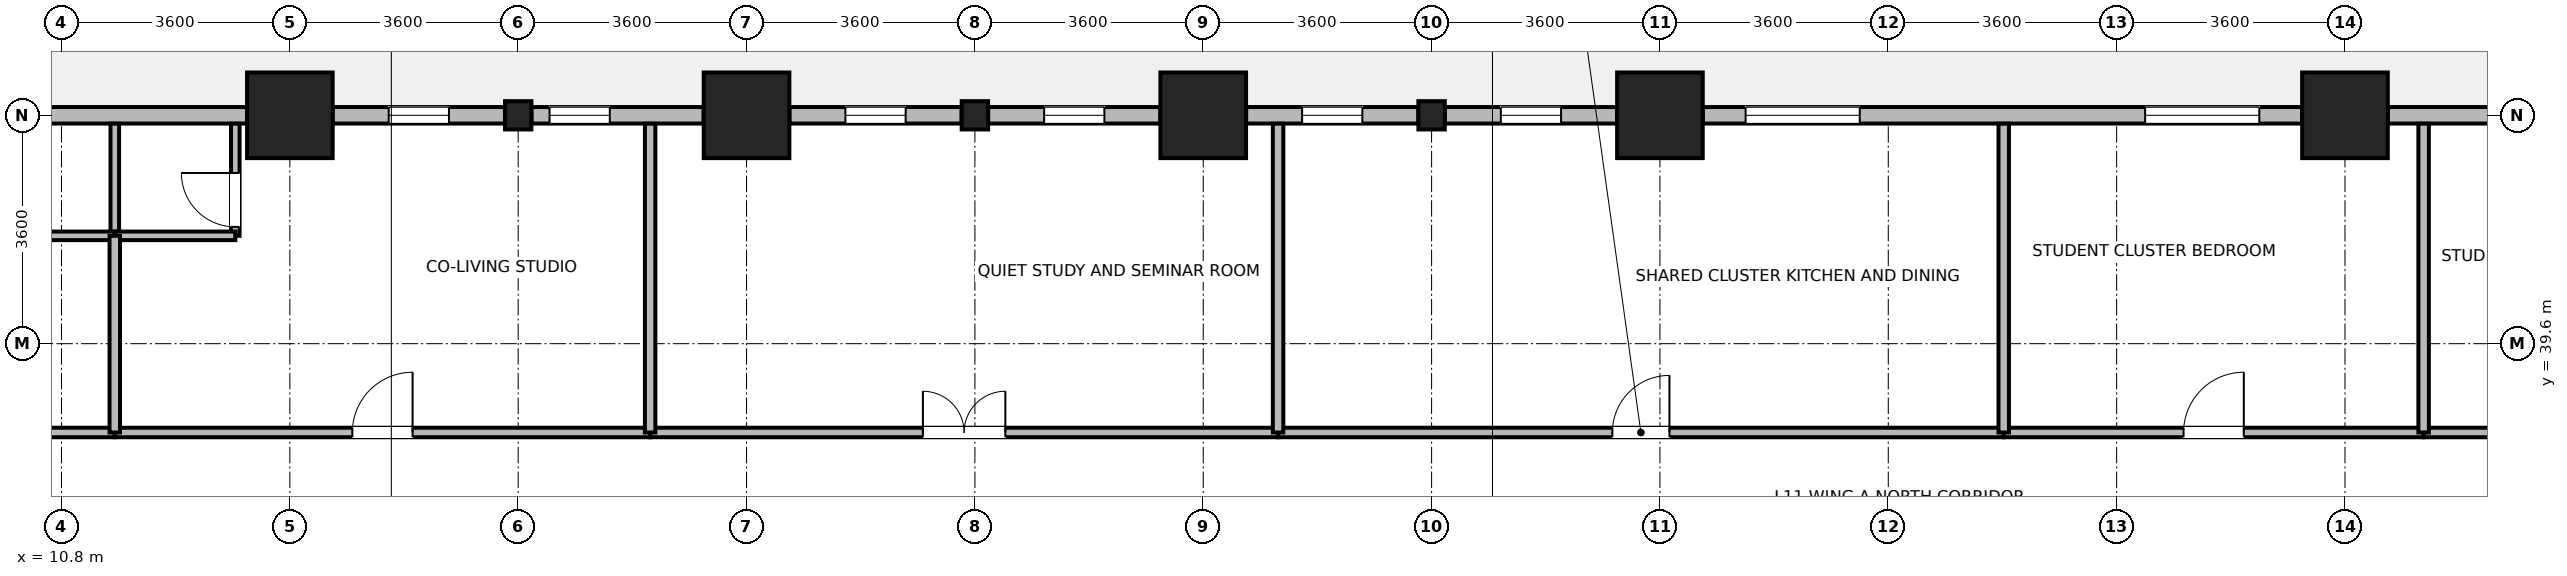
"""IFC4 building model, lengths in metres.
Left out: names, types, materials, properties, quantities, classifications, styles, units other than length and angle.
Written with IfcOpenShell. Run it as: python <this file> out.ifc"""

import sys

from ifc_helpers import new_model, si_unit, direction, frame, frame_2d, origin, origin_2d, place, context, subcontext, project, spatial, rectangle, i_section, extrude, source, transform, mapped, element, fill, save


model = new_model("IFC4")
c1 = context("Model", 3, precision=1e-05, world=origin(), true_north=direction((0.0, 1.0)))
c2 = subcontext(c1, "Body", "Model", "MODEL_VIEW")
j1 = project(units=[si_unit("LENGTHUNIT", "METRE"), si_unit("PLANEANGLEUNIT", "RADIAN")], contexts=[c1])
p1 = place(None, origin())
s1 = spatial("IfcSite", under=j1, at=p1, CompositionType="ELEMENT")
p2 = place(p1, origin())
s2 = spatial("IfcBuilding", under=s1, at=p2, CompositionType="ELEMENT")
p3 = place(p2, frame((0.0, 0.0, 47.5)))
s3 = spatial("IfcBuildingStorey", under=s2, at=p3, CompositionType="ELEMENT", Elevation=47.5)
m1 = source(origin(), c2, "Body", "SweptSolid", [
    extrude(rectangle(XDim=1.35, YDim=1.35, at=origin_2d()), origin(), (0.0, 0.0, 1.0), 3.7),
])
for number, where, z_axis, x_axis in (
    (1, (14.4, 43.2, 0.0), (0.0, 0.0, 1.0), (1.0, 0.0, 0.0)),
    (2, (21.6, 43.2, 0.0), (0.0, 0.0, 1.0), (1.0, 0.0, 0.0)),
    (3, (28.8, 43.2, 0.0), (0.0, 0.0, 1.0), (1.0, 0.0, 0.0)),
    (4, (36.0, 43.2, 0.0), (0.0, 0.0, 1.0), (1.0, 0.0, 0.0)),
    (5, (46.8, 43.2, 0.0), (0.0, 0.0, 1.0), (1.0, 0.0, 0.0)),
):
    element("IfcColumn", number, at=place(p3, frame(where, z_axis=z_axis, x_axis=x_axis)), inside=s3, PredefinedType="COLUMN", context=c2, shape_type="MappedRepresentation", body=[
        mapped(m1, transform((0.0, 0.0, 0.0), x_axis=(1.0, 0.0, 0.0), y_axis=(0.0, 1.0, 0.0), z_axis=(0.0, 0.0, 1.0), scale=1.0)),
    ])
m2 = source(origin(), c2, "Body", "SweptSolid", [
    extrude(i_section(OverallWidth=0.416, OverallDepth=0.446, WebThickness=0.029, FlangeThickness=0.04, FilletRadius=0.015, at=origin_2d()), origin(), (0.0, 0.0, 1.0), 3.7),
])
for number, where, z_axis, x_axis in (
    (6, (18.0, 43.2, 0.0), (0.0, 0.0, 1.0), (1.0, 0.0, 0.0)),
    (7, (25.2, 43.2, 0.0), (0.0, 0.0, 1.0), (1.0, 0.0, 0.0)),
    (8, (32.4, 43.2, 0.0), (0.0, 0.0, 1.0), (1.0, 0.0, 0.0)),
):
    element("IfcColumn", number, at=place(p3, frame(where, z_axis=z_axis, x_axis=x_axis)), inside=s3, PredefinedType="COLUMN", context=c2, shape_type="MappedRepresentation", body=[
        mapped(m2, transform((0.0, 0.0, 0.0), x_axis=(1.0, 0.0, 0.0), y_axis=(0.0, 1.0, 0.0), z_axis=(0.0, 0.0, 1.0), scale=1.0)),
    ])
p4 = place(p3, frame((47.476, 43.2, 0.0), z_axis=(0.0, 0.0, 1.0), x_axis=(1.0, 0.0, 0.0)))
e9 = element("IfcWall", 9, at=p4, inside=s3, PredefinedType="STANDARD", context=c2, shape_type="SweptSolid", body=[
    extrude(rectangle(XDim=9.989, YDim=0.26, at=frame_2d((4.995, 0.0))), origin(), (0.0, 0.0, 1.0), 3.43),
])
p5 = place(p4, frame((4.245, 0.0, 0.0)))
e10 = element("IfcOpeningElement", 10, at=p5, cuts=e9, PredefinedType="OPENING", context=c2, shape_type="SweptSolid", body=[
    extrude(rectangle(XDim=1.5, YDim=2.15, at=frame_2d((0.75, 1.075))), frame((0.0, 0.14, 0.0), z_axis=(0.0, -1.0, 0.0), x_axis=(1.0, 0.0, 0.0)), (0.0, 0.0, 1.0), 0.28),
])
p6 = place(p3, frame((36.676, 43.2, 0.0), z_axis=(0.0, 0.0, 1.0), x_axis=(1.0, 0.0, 0.0)))
e11 = element("IfcWall", 11, at=p6, inside=s3, PredefinedType="STANDARD", context=c2, shape_type="SweptSolid", body=[
    extrude(rectangle(XDim=9.448, YDim=0.26, at=frame_2d((4.724, 0.0))), origin(), (0.0, 0.0, 1.0), 2.93),
])
p7 = place(p6, frame((0.675, 0.0, 0.85)))
e12 = element("IfcOpeningElement", 12, at=p7, cuts=e11, PredefinedType="OPENING", context=c2, shape_type="SweptSolid", body=[
    extrude(rectangle(XDim=1.8, YDim=1.85, at=frame_2d((0.9, 0.925))), frame((0.0, 0.14, 0.0), z_axis=(0.0, -1.0, 0.0), x_axis=(1.0, 0.0, 0.0)), (0.0, 0.0, 1.0), 0.28),
])
p8 = place(p6, frame((6.973, 0.0, 0.85)))
e13 = element("IfcOpeningElement", 13, at=p8, cuts=e11, PredefinedType="OPENING", context=c2, shape_type="SweptSolid", body=[
    extrude(rectangle(XDim=1.8, YDim=1.85, at=frame_2d((0.9, 0.925))), frame((0.0, 0.14, 0.0), z_axis=(0.0, -1.0, 0.0), x_axis=(1.0, 0.0, 0.0)), (0.0, 0.0, 1.0), 0.28),
])
p9 = place(p3, frame((32.609, 43.2, 0.0), z_axis=(0.0, 0.0, 1.0), x_axis=(1.0, 0.0, 0.0)))
e14 = element("IfcWall", 14, at=p9, inside=s3, PredefinedType="STANDARD", context=c2, shape_type="SweptSolid", body=[
    extrude(rectangle(XDim=2.715, YDim=0.26, at=frame_2d((1.357, 0.0))), origin(), (0.0, 0.0, 1.0), 2.93),
])
p10 = place(p9, frame((0.883, 0.0, 0.85)))
e15 = element("IfcOpeningElement", 15, at=p10, cuts=e14, PredefinedType="OPENING", context=c2, shape_type="SweptSolid", body=[
    extrude(rectangle(XDim=0.95, YDim=1.75, at=frame_2d((0.475, 0.875))), frame((0.0, 0.14, 0.0), z_axis=(0.0, -1.0, 0.0), x_axis=(1.0, 0.0, 0.0)), (0.0, 0.0, 1.0), 0.28),
])
p11 = place(p3, frame((29.476, 43.2, 0.0), z_axis=(0.0, 0.0, 1.0), x_axis=(1.0, 0.0, 0.0)))
e16 = element("IfcWall", 16, at=p11, inside=s3, PredefinedType="STANDARD", context=c2, shape_type="SweptSolid", body=[
    extrude(rectangle(XDim=2.715, YDim=0.26, at=frame_2d((1.357, 0.0))), origin(), (0.0, 0.0, 1.0), 2.93),
])
p12 = place(p11, frame((0.883, 0.0, 0.85)))
e17 = element("IfcOpeningElement", 17, at=p12, cuts=e16, PredefinedType="OPENING", context=c2, shape_type="SweptSolid", body=[
    extrude(rectangle(XDim=0.95, YDim=1.75, at=frame_2d((0.475, 0.875))), frame((0.0, 0.14, 0.0), z_axis=(0.0, -1.0, 0.0), x_axis=(1.0, 0.0, 0.0)), (0.0, 0.0, 1.0), 0.28),
])
p13 = place(p3, frame((25.409, 43.2, 0.0), z_axis=(0.0, 0.0, 1.0), x_axis=(1.0, 0.0, 0.0)))
e18 = element("IfcWall", 18, at=p13, inside=s3, PredefinedType="STANDARD", context=c2, shape_type="SweptSolid", body=[
    extrude(rectangle(XDim=2.715, YDim=0.26, at=frame_2d((1.357, 0.0))), origin(), (0.0, 0.0, 1.0), 2.93),
])
p14 = place(p13, frame((0.883, 0.0, 0.85)))
e19 = element("IfcOpeningElement", 19, at=p14, cuts=e18, PredefinedType="OPENING", context=c2, shape_type="SweptSolid", body=[
    extrude(rectangle(XDim=0.95, YDim=1.75, at=frame_2d((0.475, 0.875))), frame((0.0, 0.14, 0.0), z_axis=(0.0, -1.0, 0.0), x_axis=(1.0, 0.0, 0.0)), (0.0, 0.0, 1.0), 0.28),
])
p15 = place(p3, frame((22.276, 43.2, 0.0), z_axis=(0.0, 0.0, 1.0), x_axis=(1.0, 0.0, 0.0)))
e20 = element("IfcWall", 20, at=p15, inside=s3, PredefinedType="STANDARD", context=c2, shape_type="SweptSolid", body=[
    extrude(rectangle(XDim=2.715, YDim=0.26, at=frame_2d((1.357, 0.0))), origin(), (0.0, 0.0, 1.0), 2.93),
])
p16 = place(p15, frame((0.883, 0.0, 0.85)))
e21 = element("IfcOpeningElement", 21, at=p16, cuts=e20, PredefinedType="OPENING", context=c2, shape_type="SweptSolid", body=[
    extrude(rectangle(XDim=0.95, YDim=1.75, at=frame_2d((0.475, 0.875))), frame((0.0, 0.14, 0.0), z_axis=(0.0, -1.0, 0.0), x_axis=(1.0, 0.0, 0.0)), (0.0, 0.0, 1.0), 0.28),
])
p17 = place(p3, frame((18.209, 43.2, 0.0), z_axis=(0.0, 0.0, 1.0), x_axis=(1.0, 0.0, 0.0)))
e22 = element("IfcWall", 22, at=p17, inside=s3, PredefinedType="STANDARD", context=c2, shape_type="SweptSolid", body=[
    extrude(rectangle(XDim=2.715, YDim=0.26, at=frame_2d((1.357, 0.0))), origin(), (0.0, 0.0, 1.0), 2.93),
])
p18 = place(p17, frame((0.285, 0.0, 0.85)))
e23 = element("IfcOpeningElement", 23, at=p18, cuts=e22, PredefinedType="OPENING", context=c2, shape_type="SweptSolid", body=[
    extrude(rectangle(XDim=0.95, YDim=1.75, at=frame_2d((0.475, 0.875))), frame((0.0, 0.14, 0.0), z_axis=(0.0, -1.0, 0.0), x_axis=(1.0, 0.0, 0.0)), (0.0, 0.0, 1.0), 0.28),
])
p19 = place(p3, frame((15.076, 43.2, 0.0), z_axis=(0.0, 0.0, 1.0), x_axis=(1.0, 0.0, 0.0)))
e24 = element("IfcWall", 24, at=p19, inside=s3, PredefinedType="STANDARD", context=c2, shape_type="SweptSolid", body=[
    extrude(rectangle(XDim=2.715, YDim=0.26, at=frame_2d((1.357, 0.0))), origin(), (0.0, 0.0, 1.0), 2.93),
])
p20 = place(p19, frame((0.883, 0.0, 0.85)))
e25 = element("IfcOpeningElement", 25, at=p20, cuts=e24, PredefinedType="OPENING", context=c2, shape_type="SweptSolid", body=[
    extrude(rectangle(XDim=0.95, YDim=1.75, at=frame_2d((0.475, 0.875))), frame((0.0, 0.14, 0.0), z_axis=(0.0, -1.0, 0.0), x_axis=(1.0, 0.0, 0.0)), (0.0, 0.0, 1.0), 0.28),
])
p21 = place(p3, frame((3.637, 43.2, 0.0), z_axis=(0.0, 0.0, 1.0), x_axis=(1.0, 0.0, 0.0)))
e26 = element("IfcWall", 26, at=p21, inside=s3, PredefinedType="STANDARD", context=c2, shape_type="SweptSolid", body=[
    extrude(rectangle(XDim=10.087, YDim=0.26, at=frame_2d((5.043, 0.0))), origin(), (0.0, 0.0, 1.0), 3.43),
])
p22 = place(p21, frame((0.781, 0.0, 0.85)))
e27 = element("IfcOpeningElement", 27, at=p22, cuts=e26, PredefinedType="OPENING", context=c2, shape_type="SweptSolid", body=[
    extrude(rectangle(XDim=1.8, YDim=1.85, at=frame_2d((0.9, 0.925))), frame((0.0, 0.14, 0.0), z_axis=(0.0, -1.0, 0.0), x_axis=(1.0, 0.0, 0.0)), (0.0, 0.0, 1.0), 0.28),
])
p23 = place(p21, frame((4.569, 0.0, 0.85)))
e28 = element("IfcOpeningElement", 28, at=p23, cuts=e26, PredefinedType="OPENING", context=c2, shape_type="SweptSolid", body=[
    extrude(rectangle(XDim=0.95, YDim=1.75, at=frame_2d((0.475, 0.875))), frame((0.0, 0.14, 0.0), z_axis=(0.0, -1.0, 0.0), x_axis=(1.0, 0.0, 0.0)), (0.0, 0.0, 1.0), 0.28),
])
p24 = place(p3, frame((11.64, 41.3, 0.0), z_axis=(0.0, 0.0, 1.0), x_axis=(0.0, 1.0, 0.0)))
e29 = element("IfcWall", 29, at=p24, inside=s3, PredefinedType="PARTITIONING", context=c2, shape_type="SweptSolid", body=[
    extrude(rectangle(XDim=1.768, YDim=0.135, at=frame_2d((0.884, 0.0))), origin(), (0.0, 0.0, 1.0), 3.43),
])
p25 = place(p3, frame((13.54, 41.3, 0.0), z_axis=(0.0, 0.0, 1.0), x_axis=(0.0, 1.0, 0.0)))
e30 = element("IfcWall", 30, at=p25, inside=s3, PredefinedType="PARTITIONING", context=c2, shape_type="SweptSolid", body=[
    extrude(rectangle(XDim=1.768, YDim=0.135, at=frame_2d((0.884, 0.0))), origin(), (0.0, 0.0, 1.0), 3.43),
])
p26 = place(p25, frame((0.141, 0.0, 0.0)))
e31 = element("IfcOpeningElement", 31, at=p26, cuts=e30, PredefinedType="OPENING", context=c2, shape_type="SweptSolid", body=[
    extrude(rectangle(XDim=0.85, YDim=2.04, at=frame_2d((0.425, 1.02))), frame((0.0, 0.078, 0.0), z_axis=(0.0, -1.0, 0.0), x_axis=(1.0, 0.0, 0.0)), (0.0, 0.0, 1.0), 0.155),
])
p27 = place(p3, frame((9.74, 41.3, 0.0), z_axis=(0.0, 0.0, 1.0), x_axis=(1.0, 0.0, 0.0)))
e32 = element("IfcWall", 32, at=p27, inside=s3, PredefinedType="PARTITIONING", context=c2, shape_type="SweptSolid", body=[
    extrude(rectangle(XDim=1.9, YDim=0.135, at=frame_2d((0.95, 0.0))), origin(), (0.0, 0.0, 1.0), 3.43),
])
p28 = place(p3, frame((11.64, 41.3, 0.0), z_axis=(0.0, 0.0, 1.0), x_axis=(1.0, 0.0, 0.0)))
e33 = element("IfcWall", 33, at=p28, inside=s3, PredefinedType="PARTITIONING", context=c2, shape_type="SweptSolid", body=[
    extrude(rectangle(XDim=1.9, YDim=0.135, at=frame_2d((0.95, 0.0))), origin(), (0.0, 0.0, 1.0), 3.43),
])
p29 = place(p3, frame((29.98, 38.2, 0.0), z_axis=(0.0, 0.0, 1.0), x_axis=(1.0, 0.0, 0.0)))
e34 = element("IfcWall", 34, at=p29, inside=s3, PredefinedType="PARTITIONING", context=c2, shape_type="SweptSolid", body=[
    extrude(rectangle(XDim=11.44, YDim=0.15, at=frame_2d((5.72, 0.0))), origin(), (0.0, 0.0, 1.0), 3.43),
])
p30 = place(p29, frame((5.27, 0.0, 0.0)))
e35 = element("IfcOpeningElement", 35, at=p30, cuts=e34, PredefinedType="OPENING", context=c2, shape_type="SweptSolid", body=[
    extrude(rectangle(XDim=0.9, YDim=2.08, at=frame_2d((0.45, 1.04))), frame((0.0, 0.085, 0.0), z_axis=(0.0, -1.0, 0.0), x_axis=(1.0, 0.0, 0.0)), (0.0, 0.0, 1.0), 0.17),
])
p31 = place(p3, frame((20.08, 38.2, 0.0), z_axis=(0.0, 0.0, 1.0), x_axis=(1.0, 0.0, 0.0)))
e36 = element("IfcWall", 36, at=p31, inside=s3, PredefinedType="PARTITIONING", context=c2, shape_type="SweptSolid", body=[
    extrude(rectangle(XDim=9.9, YDim=0.15, at=frame_2d((4.95, 0.0))), origin(), (0.0, 0.0, 1.0), 3.43),
])
p32 = place(p31, frame((4.3, 0.0, 0.0)))
e37 = element("IfcOpeningElement", 37, at=p32, cuts=e36, PredefinedType="OPENING", context=c2, shape_type="SweptSolid", body=[
    extrude(rectangle(XDim=1.3, YDim=2.12, at=frame_2d((0.65, 1.06))), frame((0.0, 0.085, 0.0), z_axis=(0.0, -1.0, 0.0), x_axis=(1.0, 0.0, 0.0)), (0.0, 0.0, 1.0), 0.17),
])
p33 = place(p3, frame((11.64, 38.2, 0.0), z_axis=(0.0, 0.0, 1.0), x_axis=(1.0, 0.0, 0.0)))
e38 = element("IfcWall", 38, at=p33, inside=s3, PredefinedType="PARTITIONING", context=c2, shape_type="SweptSolid", body=[
    extrude(rectangle(XDim=8.44, YDim=0.15, at=frame_2d((4.22, 0.0))), origin(), (0.0, 0.0, 1.0), 3.43),
])
p34 = place(p33, frame((3.745, 0.0, 0.0)))
e39 = element("IfcOpeningElement", 39, at=p34, cuts=e38, PredefinedType="OPENING", context=c2, shape_type="SweptSolid", body=[
    extrude(rectangle(XDim=0.95, YDim=2.1, at=frame_2d((0.475, 1.05))), frame((0.0, 0.085, 0.0), z_axis=(0.0, -1.0, 0.0), x_axis=(1.0, 0.0, 0.0)), (0.0, 0.0, 1.0), 0.17),
])
p35 = place(p3, frame((3.62, 38.2, 0.0), z_axis=(0.0, 0.0, 1.0), x_axis=(1.0, 0.0, 0.0)))
e40 = element("IfcWall", 40, at=p35, inside=s3, PredefinedType="PARTITIONING", context=c2, shape_type="SweptSolid", body=[
    extrude(rectangle(XDim=8.02, YDim=0.15, at=frame_2d((4.01, 0.0))), origin(), (0.0, 0.0, 1.0), 3.43),
])
p36 = place(p35, frame((3.535, 0.0, 0.0)))
e41 = element("IfcOpeningElement", 41, at=p36, cuts=e40, PredefinedType="OPENING", context=c2, shape_type="SweptSolid", body=[
    extrude(rectangle(XDim=0.95, YDim=2.1, at=frame_2d((0.475, 1.05))), frame((0.0, 0.085, 0.0), z_axis=(0.0, -1.0, 0.0), x_axis=(1.0, 0.0, 0.0)), (0.0, 0.0, 1.0), 0.17),
])
p37 = place(p3, frame((48.04, 38.2, 0.0), z_axis=(0.0, 0.0, 1.0), x_axis=(1.0, 0.0, 0.0)))
e42 = element("IfcWall", 42, at=p37, inside=s3, PredefinedType="PARTITIONING", context=c2, shape_type="SweptSolid", body=[
    extrude(rectangle(XDim=7.0, YDim=0.15, at=frame_2d((3.5, 0.0))), origin(), (0.0, 0.0, 1.0), 3.43),
])
p38 = place(p37, frame((3.025, 0.0, 0.0)))
e43 = element("IfcOpeningElement", 43, at=p38, cuts=e42, PredefinedType="OPENING", context=c2, shape_type="SweptSolid", body=[
    extrude(rectangle(XDim=0.95, YDim=2.1, at=frame_2d((0.475, 1.05))), frame((0.0, 0.085, 0.0), z_axis=(0.0, -1.0, 0.0), x_axis=(1.0, 0.0, 0.0)), (0.0, 0.0, 1.0), 0.17),
])
p39 = place(p3, frame((41.42, 38.2, 0.0), z_axis=(0.0, 0.0, 1.0), x_axis=(1.0, 0.0, 0.0)))
e44 = element("IfcWall", 44, at=p39, inside=s3, PredefinedType="PARTITIONING", context=c2, shape_type="SweptSolid", body=[
    extrude(rectangle(XDim=6.62, YDim=0.15, at=frame_2d((3.31, 0.0))), origin(), (0.0, 0.0, 1.0), 3.43),
])
p40 = place(p39, frame((2.835, 0.0, 0.0)))
e45 = element("IfcOpeningElement", 45, at=p40, cuts=e44, PredefinedType="OPENING", context=c2, shape_type="SweptSolid", body=[
    extrude(rectangle(XDim=0.95, YDim=2.1, at=frame_2d((0.475, 1.05))), frame((0.0, 0.085, 0.0), z_axis=(0.0, -1.0, 0.0), x_axis=(1.0, 0.0, 0.0)), (0.0, 0.0, 1.0), 0.17),
])
for number, where, z_axis, x_axis in (
    (46, (20.08, 38.2, 0.0), (0.0, 0.0, 1.0), (0.0, 1.0, 0.0)),
    (47, (29.98, 38.2, 0.0), (0.0, 0.0, 1.0), (0.0, 1.0, 0.0)),
    (48, (41.42, 38.2, 0.0), (0.0, 0.0, 1.0), (0.0, 1.0, 0.0)),
    (49, (48.04, 38.2, 0.0), (0.0, 0.0, 1.0), (0.0, 1.0, 0.0)),
):
    element("IfcWall", number, at=place(p3, frame(where, z_axis=z_axis, x_axis=x_axis)), inside=s3, PredefinedType="PARTITIONING", context=c2, shape_type="SweptSolid", body=[
        extrude(rectangle(XDim=4.868, YDim=0.165, at=frame_2d((2.434, 0.0))), origin(), (0.0, 0.0, 1.0), 3.43),
    ])
p41 = place(p3, frame((11.64, 38.2, 0.0), z_axis=(0.0, 0.0, 1.0), x_axis=(0.0, 1.0, 0.0)))
e50 = element("IfcWall", 50, at=p41, inside=s3, PredefinedType="PARTITIONING", context=c2, shape_type="SweptSolid", body=[
    extrude(rectangle(XDim=3.1, YDim=0.165, at=frame_2d((1.55, 0.0))), origin(), (0.0, 0.0, 1.0), 3.43),
])
p42 = place(p7, origin())
e51 = element("IfcWindow", 51, at=p42, inside=s3, PartitioningType="SINGLE_PANEL", PredefinedType="WINDOW", context=c2, shape_type="SweptSolid", body=[
    extrude(rectangle(XDim=1.8, YDim=1.85, at=frame_2d((0.9, 0.925))), frame((0.0, 0.03, 0.0), z_axis=(0.0, -1.0, 0.0), x_axis=(1.0, 0.0, 0.0)), (0.0, 0.0, 1.0), 0.06),
])
fill(e12, e51)
p43 = place(p8, origin())
e52 = element("IfcWindow", 52, at=p43, inside=s3, PartitioningType="SINGLE_PANEL", PredefinedType="WINDOW", context=c2, shape_type="SweptSolid", body=[
    extrude(rectangle(XDim=1.8, YDim=1.85, at=frame_2d((0.9, 0.925))), frame((0.0, 0.03, 0.0), z_axis=(0.0, -1.0, 0.0), x_axis=(1.0, 0.0, 0.0)), (0.0, 0.0, 1.0), 0.06),
])
fill(e13, e52)
p44 = place(p10, origin())
e53 = element("IfcWindow", 53, at=p44, inside=s3, PartitioningType="SINGLE_PANEL", PredefinedType="WINDOW", context=c2, shape_type="SweptSolid", body=[
    extrude(rectangle(XDim=0.95, YDim=1.75, at=frame_2d((0.475, 0.875))), frame((0.0, 0.03, 0.0), z_axis=(0.0, -1.0, 0.0), x_axis=(1.0, 0.0, 0.0)), (0.0, 0.0, 1.0), 0.06),
])
fill(e15, e53)
p45 = place(p12, origin())
e54 = element("IfcWindow", 54, at=p45, inside=s3, PartitioningType="SINGLE_PANEL", PredefinedType="WINDOW", context=c2, shape_type="SweptSolid", body=[
    extrude(rectangle(XDim=0.95, YDim=1.75, at=frame_2d((0.475, 0.875))), frame((0.0, 0.03, 0.0), z_axis=(0.0, -1.0, 0.0), x_axis=(1.0, 0.0, 0.0)), (0.0, 0.0, 1.0), 0.06),
])
fill(e17, e54)
p46 = place(p14, origin())
e55 = element("IfcWindow", 55, at=p46, inside=s3, PartitioningType="SINGLE_PANEL", PredefinedType="WINDOW", context=c2, shape_type="SweptSolid", body=[
    extrude(rectangle(XDim=0.95, YDim=1.75, at=frame_2d((0.475, 0.875))), frame((0.0, 0.03, 0.0), z_axis=(0.0, -1.0, 0.0), x_axis=(1.0, 0.0, 0.0)), (0.0, 0.0, 1.0), 0.06),
])
fill(e19, e55)
p47 = place(p16, origin())
e56 = element("IfcWindow", 56, at=p47, inside=s3, PartitioningType="SINGLE_PANEL", PredefinedType="WINDOW", context=c2, shape_type="SweptSolid", body=[
    extrude(rectangle(XDim=0.95, YDim=1.75, at=frame_2d((0.475, 0.875))), frame((0.0, 0.03, 0.0), z_axis=(0.0, -1.0, 0.0), x_axis=(1.0, 0.0, 0.0)), (0.0, 0.0, 1.0), 0.06),
])
fill(e21, e56)
p48 = place(p18, origin())
e57 = element("IfcWindow", 57, at=p48, inside=s3, PartitioningType="SINGLE_PANEL", PredefinedType="WINDOW", context=c2, shape_type="SweptSolid", body=[
    extrude(rectangle(XDim=0.95, YDim=1.75, at=frame_2d((0.475, 0.875))), frame((0.0, 0.03, 0.0), z_axis=(0.0, -1.0, 0.0), x_axis=(1.0, 0.0, 0.0)), (0.0, 0.0, 1.0), 0.06),
])
fill(e23, e57)
p49 = place(p20, origin())
e58 = element("IfcWindow", 58, at=p49, inside=s3, PartitioningType="SINGLE_PANEL", PredefinedType="WINDOW", context=c2, shape_type="SweptSolid", body=[
    extrude(rectangle(XDim=0.95, YDim=1.75, at=frame_2d((0.475, 0.875))), frame((0.0, 0.03, 0.0), z_axis=(0.0, -1.0, 0.0), x_axis=(1.0, 0.0, 0.0)), (0.0, 0.0, 1.0), 0.06),
])
fill(e25, e58)
p50 = place(p26, origin())
e59 = element("IfcDoor", 59, at=p50, inside=s3, OperationType="SINGLE_SWING_RIGHT", PredefinedType="DOOR", context=c2, shape_type="SweptSolid", body=[
    extrude(rectangle(XDim=0.85, YDim=2.04, at=frame_2d((0.425, 1.02))), frame((0.0, 0.025, 0.0), z_axis=(0.0, -1.0, 0.0), x_axis=(1.0, 0.0, 0.0)), (0.0, 0.0, 1.0), 0.05),
])
fill(e31, e59)
p51 = place(p30, origin())
e60 = element("IfcDoor", 60, at=p51, inside=s3, OperationType="SINGLE_SWING_RIGHT", PredefinedType="DOOR", context=c2, shape_type="SweptSolid", body=[
    extrude(rectangle(XDim=0.9, YDim=2.08, at=frame_2d((0.45, 1.04))), frame((0.0, 0.025, 0.0), z_axis=(0.0, -1.0, 0.0), x_axis=(1.0, 0.0, 0.0)), (0.0, 0.0, 1.0), 0.05),
])
fill(e35, e60)
p52 = place(p32, origin())
e61 = element("IfcDoor", 61, at=p52, inside=s3, OperationType="DOUBLE_DOOR_SINGLE_SWING", PredefinedType="DOOR", context=c2, shape_type="SweptSolid", body=[
    extrude(rectangle(XDim=1.3, YDim=2.12, at=frame_2d((0.65, 1.06))), frame((0.0, 0.025, 0.0), z_axis=(0.0, -1.0, 0.0), x_axis=(1.0, 0.0, 0.0)), (0.0, 0.0, 1.0), 0.05),
])
fill(e37, e61)
p53 = place(p34, origin())
e62 = element("IfcDoor", 62, at=p53, inside=s3, OperationType="SINGLE_SWING_RIGHT", PredefinedType="DOOR", context=c2, shape_type="SweptSolid", body=[
    extrude(rectangle(XDim=0.95, YDim=2.1, at=frame_2d((0.475, 1.05))), frame((0.0, 0.025, 0.0), z_axis=(0.0, -1.0, 0.0), x_axis=(1.0, 0.0, 0.0)), (0.0, 0.0, 1.0), 0.05),
])
fill(e39, e62)
p54 = place(p40, origin())
e63 = element("IfcDoor", 63, at=p54, inside=s3, OperationType="SINGLE_SWING_RIGHT", PredefinedType="DOOR", context=c2, shape_type="SweptSolid", body=[
    extrude(rectangle(XDim=0.95, YDim=2.1, at=frame_2d((0.475, 1.05))), frame((0.0, 0.025, 0.0), z_axis=(0.0, -1.0, 0.0), x_axis=(1.0, 0.0, 0.0)), (0.0, 0.0, 1.0), 0.05),
])
fill(e45, e63)
save(model, sys.argv[1])
